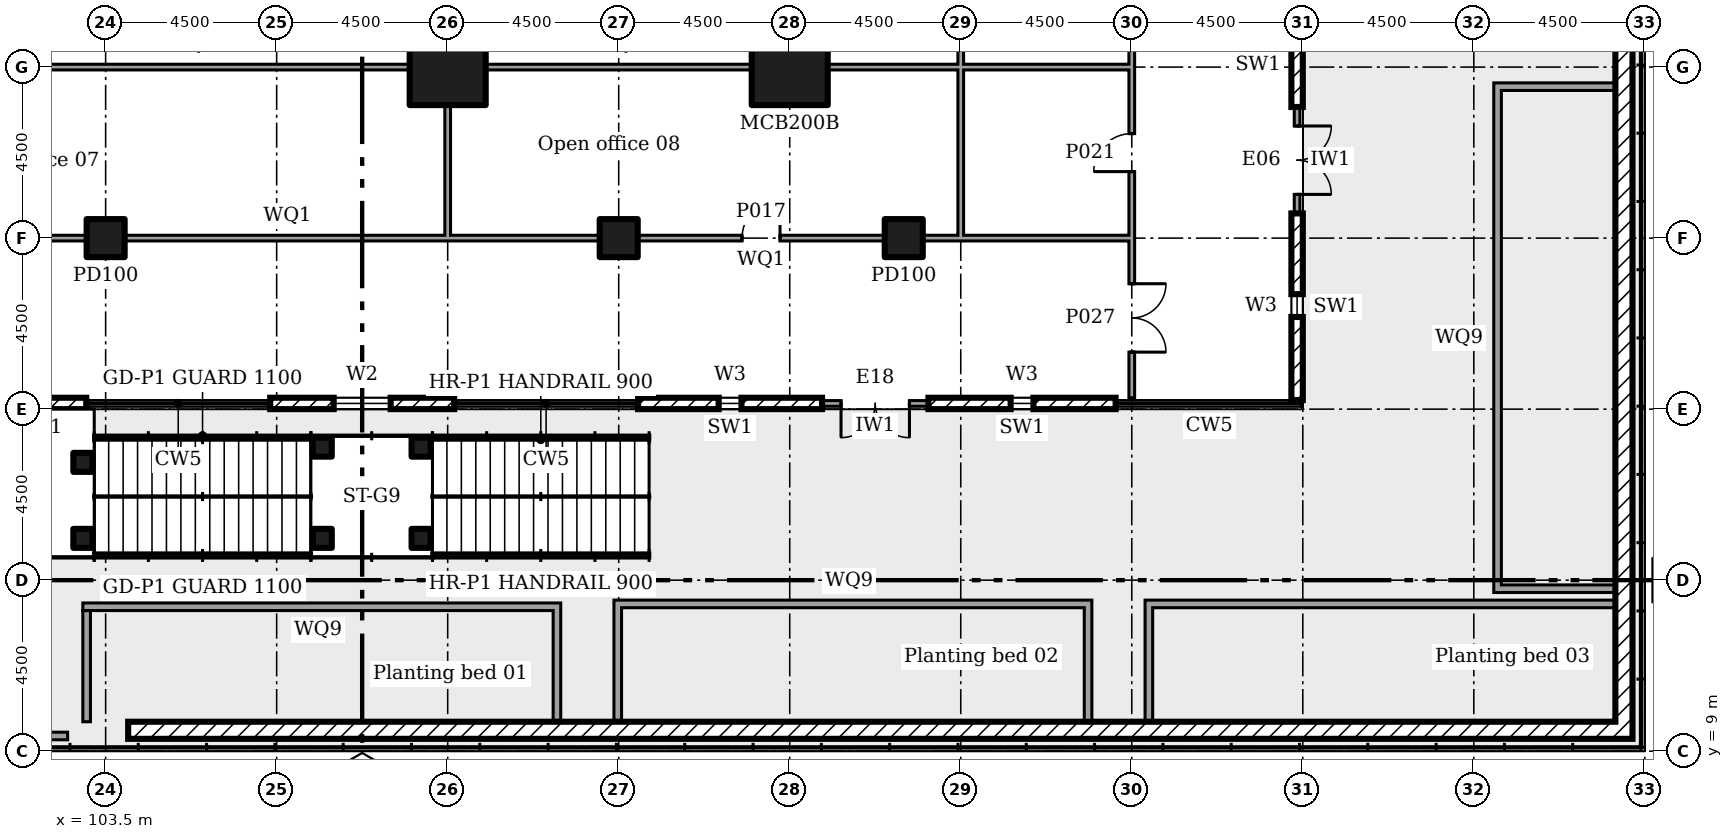
"""IFC4 building model, lengths in metres.
Left out: names, types, materials, properties, quantities, classifications, styles, units other than length and angle.
Written with IfcOpenShell. Run it as: python <this file> out.ifc"""

import sys

from ifc_helpers import new_model, si_unit, direction, frame, frame_2d, origin, origin_2d, place, context, subcontext, project, spatial, rectangle, extrude, element, fill, save


model = new_model("IFC4")
c1 = context("Model", 3, precision=1e-05, world=origin(), true_north=direction((0.0, 1.0)))
c2 = subcontext(c1, "Body", "Model", "MODEL_VIEW")
j1 = project(units=[si_unit("LENGTHUNIT", "METRE"), si_unit("PLANEANGLEUNIT", "RADIAN")], contexts=[c1])
p1 = place(None, origin())
s1 = spatial("IfcSite", under=j1, at=p1, CompositionType="ELEMENT")
p2 = place(p1, origin())
s2 = spatial("IfcBuilding", under=s1, at=p2, CompositionType="ELEMENT")
p3 = place(p2, frame((0.0, 0.0, 11.5)))
s3 = spatial("IfcBuildingStorey", under=s2, at=p3, CompositionType="ELEMENT", Elevation=11.5)
for number, where in (
    (1, (112.5, 27.0, 0.0)),
    (2, (121.5, 27.0, 0.0)),
):
    element("IfcColumn", number, at=place(p3, frame(where)), inside=s3, PredefinedType="COLUMN", context=c2, shape_type="SweptSolid", body=[
        extrude(rectangle(XDim=2.0, YDim=2.0, at=origin_2d()), origin(), (0.0, 0.0, 1.0), 5.0),
    ])
for number, where in (
    (3, (103.5, 22.5, 0.0)),
    (4, (117.0, 22.5, 0.0)),
    (5, (124.5, 22.5, 0.0)),
):
    element("IfcColumn", number, at=place(p3, frame(where)), inside=s3, PredefinedType="COLUMN", context=c2, shape_type="SweptSolid", body=[
        extrude(rectangle(XDim=1.0, YDim=1.0, at=origin_2d()), origin(), (0.0, 0.0, 1.0), 5.0),
    ])
p4 = place(p3, frame((98.15, 18.15, 0.0)))
e6 = element("IfcWall", 6, at=p4, inside=s3, PredefinedType="ELEMENTEDWALL", context=c2, shape_type="SweptSolid", body=[
    extrude(rectangle(XDim=4.84, YDim=0.3, at=frame_2d((2.42, 0.0))), origin(), (0.0, 0.0, 1.0), 4.55),
])
p5 = place(p4, frame((2.12, 0.0, 0.45)))
e7 = element("IfcOpeningElement", 7, at=p5, cuts=e6, PredefinedType="OPENING", context=c2, shape_type="SweptSolid", body=[
    extrude(rectangle(XDim=0.6, YDim=2.4, at=frame_2d((0.3, 1.2))), frame((0.0, 0.16, 0.0), z_axis=(0.0, -1.0, 0.0), x_axis=(1.0, 0.0, 0.0)), (0.0, 0.0, 1.0), 0.32),
])
p6 = place(p3, frame((107.83, 18.15, 0.0)))
e8 = element("IfcWall", 8, at=p6, inside=s3, PredefinedType="ELEMENTEDWALL", context=c2, shape_type="SweptSolid", body=[
    extrude(rectangle(XDim=4.84, YDim=0.3, at=frame_2d((2.42, 0.0))), origin(), (0.0, 0.0, 1.0), 4.55),
])
p7 = place(p6, frame((1.67, 0.0, 0.9)))
e9 = element("IfcOpeningElement", 9, at=p7, cuts=e8, PredefinedType="OPENING", context=c2, shape_type="SweptSolid", body=[
    extrude(rectangle(XDim=1.5, YDim=1.8, at=frame_2d((0.75, 0.9))), frame((0.0, 0.16, 0.0), z_axis=(0.0, -1.0, 0.0), x_axis=(1.0, 0.0, 0.0)), (0.0, 0.0, 1.0), 0.32),
])
p8 = place(p3, frame((117.51, 18.15, 0.0)))
e10 = element("IfcWall", 10, at=p8, inside=s3, PredefinedType="ELEMENTEDWALL", context=c2, shape_type="SweptSolid", body=[
    extrude(rectangle(XDim=4.84, YDim=0.3, at=frame_2d((2.42, 0.0))), origin(), (0.0, 0.0, 1.0), 4.55),
])
p9 = place(p8, frame((2.12, 0.0, 0.45)))
e11 = element("IfcOpeningElement", 11, at=p9, cuts=e10, PredefinedType="OPENING", context=c2, shape_type="SweptSolid", body=[
    extrude(rectangle(XDim=0.6, YDim=2.4, at=frame_2d((0.3, 1.2))), frame((0.0, 0.16, 0.0), z_axis=(0.0, -1.0, 0.0), x_axis=(1.0, 0.0, 0.0)), (0.0, 0.0, 1.0), 0.32),
])
p10 = place(p3, frame((122.35, 18.15, 0.0)))
e12 = element("IfcWall", 12, at=p10, inside=s3, PredefinedType="SOLIDWALL", context=c2, shape_type="SweptSolid", body=[
    extrude(rectangle(XDim=2.8, YDim=0.15, at=frame_2d((1.4, 0.0))), origin(), (0.0, 0.0, 1.0), 4.55),
])
p11 = place(p10, frame((0.5, 0.0, 0.0)))
e13 = element("IfcOpeningElement", 13, at=p11, cuts=e12, PredefinedType="OPENING", context=c2, shape_type="SweptSolid", body=[
    extrude(rectangle(XDim=1.8, YDim=2.4, at=frame_2d((0.9, 1.2))), frame((0.0, 0.085, 0.0), z_axis=(0.0, -1.0, 0.0), x_axis=(1.0, 0.0, 0.0)), (0.0, 0.0, 1.0), 0.17),
])
p12 = place(p3, frame((125.15, 18.15, 0.0)))
e14 = element("IfcWall", 14, at=p12, inside=s3, PredefinedType="ELEMENTEDWALL", context=c2, shape_type="SweptSolid", body=[
    extrude(rectangle(XDim=4.925, YDim=0.3, at=frame_2d((2.462, 0.0))), origin(), (0.0, 0.0, 1.0), 4.55),
])
p13 = place(p12, frame((2.163, 0.0, 0.45)))
e15 = element("IfcOpeningElement", 15, at=p13, cuts=e14, PredefinedType="OPENING", context=c2, shape_type="SweptSolid", body=[
    extrude(rectangle(XDim=0.6, YDim=2.4, at=frame_2d((0.3, 1.2))), frame((0.0, 0.16, 0.0), z_axis=(0.0, -1.0, 0.0), x_axis=(1.0, 0.0, 0.0)), (0.0, 0.0, 1.0), 0.32),
])
p14 = place(p3, frame((134.85, 18.238, 0.0), z_axis=(0.0, 0.0, 1.0), x_axis=(0.0, 1.0, 0.0)))
e16 = element("IfcWall", 16, at=p14, inside=s3, PredefinedType="ELEMENTEDWALL", context=c2, shape_type="SweptSolid", body=[
    extrude(rectangle(XDim=4.912, YDim=0.3, at=frame_2d((2.456, 0.0))), origin(), (0.0, 0.0, 1.0), 4.55),
])
p15 = place(p14, frame((2.188, 0.0, 0.45)))
e17 = element("IfcOpeningElement", 17, at=p15, cuts=e16, PredefinedType="OPENING", context=c2, shape_type="SweptSolid", body=[
    extrude(rectangle(XDim=0.6, YDim=2.4, at=frame_2d((0.3, 1.2))), frame((0.0, 0.16, 0.0), z_axis=(0.0, -1.0, 0.0), x_axis=(1.0, 0.0, 0.0)), (0.0, 0.0, 1.0), 0.32),
])
p16 = place(p3, frame((134.85, 23.15, 0.0), z_axis=(0.0, 0.0, 1.0), x_axis=(0.0, 1.0, 0.0)))
e18 = element("IfcWall", 18, at=p16, inside=s3, PredefinedType="SOLIDWALL", context=c2, shape_type="SweptSolid", body=[
    extrude(rectangle(XDim=2.8, YDim=0.15, at=frame_2d((1.4, 0.0))), origin(), (0.0, 0.0, 1.0), 4.55),
])
p17 = place(p16, frame((0.5, 0.0, 0.0)))
e19 = element("IfcOpeningElement", 19, at=p17, cuts=e18, PredefinedType="OPENING", context=c2, shape_type="SweptSolid", body=[
    extrude(rectangle(XDim=1.8, YDim=2.4, at=frame_2d((0.9, 1.2))), frame((0.0, 0.085, 0.0), z_axis=(0.0, -1.0, 0.0), x_axis=(1.0, 0.0, 0.0)), (0.0, 0.0, 1.0), 0.17),
])
p18 = place(p3, frame((134.85, 25.95, 0.0), z_axis=(0.0, 0.0, 1.0), x_axis=(0.0, 1.0, 0.0)))
e20 = element("IfcWall", 20, at=p18, inside=s3, PredefinedType="ELEMENTEDWALL", context=c2, shape_type="SweptSolid", body=[
    extrude(rectangle(XDim=4.43, YDim=0.3, at=frame_2d((2.215, 0.0))), origin(), (0.0, 0.0, 1.0), 4.55),
])
p19 = place(p18, frame((1.915, 0.0, 0.45)))
e21 = element("IfcOpeningElement", 21, at=p19, cuts=e20, PredefinedType="OPENING", context=c2, shape_type="SweptSolid", body=[
    extrude(rectangle(XDim=0.6, YDim=2.4, at=frame_2d((0.3, 1.2))), frame((0.0, 0.16, 0.0), z_axis=(0.0, -1.0, 0.0), x_axis=(1.0, 0.0, 0.0)), (0.0, 0.0, 1.0), 0.32),
])
p20 = place(p3, frame((104.093, 9.55, 0.0)))
e22 = element("IfcWall", 22, at=p20, inside=s3, PredefinedType="SOLIDWALL", context=c2, shape_type="SweptSolid", body=[
    extrude(rectangle(XDim=39.583, YDim=0.45, at=frame_2d((19.791, 0.0))), origin(), (0.0, 0.0, 1.0), 0.6),
])
p21 = place(p3, frame((143.45, 9.775, 0.0), z_axis=(0.0, 0.0, 1.0), x_axis=(0.0, 1.0, 0.0)))
e23 = element("IfcWall", 23, at=p21, inside=s3, PredefinedType="SOLIDWALL", context=c2, shape_type="SweptSolid", body=[
    extrude(rectangle(XDim=79.9, YDim=0.45, at=frame_2d((39.95, 0.0))), origin(), (0.0, 0.0, 1.0), 0.6),
])
p22 = place(p3, frame((115.375, 9.775, 0.0), z_axis=(0.0, 0.0, 1.0), x_axis=(0.0, 1.0, 0.0)))
e24 = element("IfcWall", 24, at=p22, inside=s3, PredefinedType="SOLIDWALL", context=c2, shape_type="SweptSolid", body=[
    extrude(rectangle(XDim=3.125, YDim=0.2, at=frame_2d((1.562, 0.0))), origin(), (0.0, 0.0, 1.0), 0.45),
])
p23 = place(p3, frame((102.9, 12.8, 0.0)))
e25 = element("IfcWall", 25, at=p23, inside=s3, PredefinedType="SOLIDWALL", context=c2, shape_type="SweptSolid", body=[
    extrude(rectangle(XDim=12.375, YDim=0.2, at=frame_2d((6.188, 0.0))), origin(), (0.0, 0.0, 1.0), 0.45),
])
p24 = place(p3, frame((103.0, 9.775, 0.0), z_axis=(0.0, 0.0, 1.0), x_axis=(0.0, 1.0, 0.0)))
e26 = element("IfcWall", 26, at=p24, inside=s3, PredefinedType="SOLIDWALL", context=c2, shape_type="SweptSolid", body=[
    extrude(rectangle(XDim=2.925, YDim=0.2, at=frame_2d((1.462, 0.0))), origin(), (0.0, 0.0, 1.0), 0.45),
])
p25 = place(p3, frame((129.35, 9.775, 0.0), z_axis=(0.0, 0.0, 1.0), x_axis=(0.0, 1.0, 0.0)))
e27 = element("IfcWall", 27, at=p25, inside=s3, PredefinedType="SOLIDWALL", context=c2, shape_type="SweptSolid", body=[
    extrude(rectangle(XDim=3.2, YDim=0.2, at=frame_2d((1.6, 0.0))), origin(), (0.0, 0.0, 1.0), 0.45),
])
p26 = place(p3, frame((116.875, 12.875, 0.0)))
e28 = element("IfcWall", 28, at=p26, inside=s3, PredefinedType="SOLIDWALL", context=c2, shape_type="SweptSolid", body=[
    extrude(rectangle(XDim=12.375, YDim=0.2, at=frame_2d((6.188, 0.0))), origin(), (0.0, 0.0, 1.0), 0.45),
])
p27 = place(p3, frame((116.975, 9.775, 0.0), z_axis=(0.0, 0.0, 1.0), x_axis=(0.0, 1.0, 0.0)))
e29 = element("IfcWall", 29, at=p27, inside=s3, PredefinedType="SOLIDWALL", context=c2, shape_type="SweptSolid", body=[
    extrude(rectangle(XDim=3.0, YDim=0.2, at=frame_2d((1.5, 0.0))), origin(), (0.0, 0.0, 1.0), 0.45),
])
p28 = place(p3, frame((130.85, 12.875, 0.0)))
e30 = element("IfcWall", 30, at=p28, inside=s3, PredefinedType="SOLIDWALL", context=c2, shape_type="SweptSolid", body=[
    extrude(rectangle(XDim=12.375, YDim=0.2, at=frame_2d((6.188, 0.0))), origin(), (0.0, 0.0, 1.0), 0.45),
])
p29 = place(p3, frame((130.95, 9.775, 0.0), z_axis=(0.0, 0.0, 1.0), x_axis=(0.0, 1.0, 0.0)))
e31 = element("IfcWall", 31, at=p29, inside=s3, PredefinedType="SOLIDWALL", context=c2, shape_type="SweptSolid", body=[
    extrude(rectangle(XDim=3.0, YDim=0.2, at=frame_2d((1.5, 0.0))), origin(), (0.0, 0.0, 1.0), 0.45),
])
for number, where in (
    (32, (140.025, 26.485, 0.0)),
    (33, (140.025, 13.275, 0.0)),
):
    element("IfcWall", number, at=place(p3, frame(where)), inside=s3, PredefinedType="SOLIDWALL", context=c2, shape_type="SweptSolid", body=[
        extrude(rectangle(XDim=3.2, YDim=0.2, at=frame_2d((1.6, 0.0))), origin(), (0.0, 0.0, 1.0), 0.45),
    ])
p30 = place(p3, frame((140.125, 13.375, 0.0), z_axis=(0.0, 0.0, 1.0), x_axis=(0.0, 1.0, 0.0)))
e34 = element("IfcWall", 34, at=p30, inside=s3, PredefinedType="SOLIDWALL", context=c2, shape_type="SweptSolid", body=[
    extrude(rectangle(XDim=13.01, YDim=0.2, at=frame_2d((6.505, 0.0))), origin(), (0.0, 0.0, 1.0), 0.45),
])
p31 = place(p3, frame((130.5, 18.3, 0.0), z_axis=(0.0, 0.0, 1.0), x_axis=(0.0, 1.0, 0.0)))
e35 = element("IfcWall", 35, at=p31, inside=s3, PredefinedType="PARTITIONING", context=c2, shape_type="SweptSolid", body=[
    extrude(rectangle(XDim=4.275, YDim=0.15, at=frame_2d((2.137, 0.0))), origin(), (0.0, 0.0, 1.0), 4.55),
])
p32 = place(p31, frame((1.2, 0.0, 0.0)))
e36 = element("IfcOpeningElement", 36, at=p32, cuts=e35, PredefinedType="OPENING", context=c2, shape_type="SweptSolid", body=[
    extrude(rectangle(XDim=1.8, YDim=2.1, at=frame_2d((0.9, 1.05))), frame((0.0, 0.085, 0.0), z_axis=(0.0, -1.0, 0.0), x_axis=(1.0, 0.0, 0.0)), (0.0, 0.0, 1.0), 0.17),
])
p33 = place(p3, frame((130.5, 26.925, 0.0), z_axis=(0.0, 0.0, 1.0), x_axis=(0.0, 1.0, 0.0)))
e37 = element("IfcWall", 37, at=p33, inside=s3, PredefinedType="PARTITIONING", context=c2, shape_type="SweptSolid", body=[
    extrude(rectangle(XDim=8.58, YDim=0.15, at=frame_2d((4.29, 0.0))), origin(), (0.0, 0.0, 1.0), 4.55),
])
p34 = place(p3, frame((130.5, 22.5, 0.0), z_axis=(0.0, 0.0, 1.0), x_axis=(0.0, 1.0, 0.0)))
e38 = element("IfcWall", 38, at=p34, inside=s3, PredefinedType="PARTITIONING", context=c2, shape_type="SweptSolid", body=[
    extrude(rectangle(XDim=4.5, YDim=0.15, at=frame_2d((2.25, 0.0))), origin(), (0.0, 0.0, 1.0), 4.55),
])
p35 = place(p34, frame((1.75, 0.0, 0.0)))
e39 = element("IfcOpeningElement", 39, at=p35, cuts=e38, PredefinedType="OPENING", context=c2, shape_type="SweptSolid", body=[
    extrude(rectangle(XDim=1.0, YDim=2.1, at=frame_2d((0.5, 1.05))), frame((0.0, 0.085, 0.0), z_axis=(0.0, -1.0, 0.0), x_axis=(1.0, 0.0, 0.0)), (0.0, 0.0, 1.0), 0.17),
])
p36 = place(p3, frame((94.5, 22.5, 0.0)))
e40 = element("IfcWall", 40, at=p36, inside=s3, PredefinedType="PARTITIONING", context=c2, shape_type="SweptSolid", body=[
    extrude(rectangle(XDim=8.505, YDim=0.15, at=frame_2d((4.252, 0.0))), origin(), (0.0, 0.0, 1.0), 4.55),
])
p37 = place(p36, frame((3.75, 0.0, 0.0)))
e41 = element("IfcOpeningElement", 41, at=p37, cuts=e40, PredefinedType="OPENING", context=c2, shape_type="SweptSolid", body=[
    extrude(rectangle(XDim=1.0, YDim=2.1, at=frame_2d((0.5, 1.05))), frame((0.0, 0.085, 0.0), z_axis=(0.0, -1.0, 0.0), x_axis=(1.0, 0.0, 0.0)), (0.0, 0.0, 1.0), 0.17),
])
p38 = place(p3, frame((103.995, 22.5, 0.0)))
e42 = element("IfcWall", 42, at=p38, inside=s3, PredefinedType="PARTITIONING", context=c2, shape_type="SweptSolid", body=[
    extrude(rectangle(XDim=8.58, YDim=0.15, at=frame_2d((4.29, 0.0))), origin(), (0.0, 0.0, 1.0), 4.55),
])
p39 = place(p3, frame((112.5, 22.5, 0.0)))
e43 = element("IfcWall", 43, at=p39, inside=s3, PredefinedType="PARTITIONING", context=c2, shape_type="SweptSolid", body=[
    extrude(rectangle(XDim=4.005, YDim=0.15, at=frame_2d((2.002, 0.0))), origin(), (0.0, 0.0, 1.0), 4.55),
])
p40 = place(p3, frame((117.495, 22.5, 0.0)))
e44 = element("IfcWall", 44, at=p40, inside=s3, PredefinedType="PARTITIONING", context=c2, shape_type="SweptSolid", body=[
    extrude(rectangle(XDim=6.51, YDim=0.15, at=frame_2d((3.255, 0.0))), origin(), (0.0, 0.0, 1.0), 4.55),
])
p41 = place(p40, frame((2.75, 0.0, 0.0)))
e45 = element("IfcOpeningElement", 45, at=p41, cuts=e44, PredefinedType="OPENING", context=c2, shape_type="SweptSolid", body=[
    extrude(rectangle(XDim=1.0, YDim=2.1, at=frame_2d((0.5, 1.05))), frame((0.0, 0.085, 0.0), z_axis=(0.0, -1.0, 0.0), x_axis=(1.0, 0.0, 0.0)), (0.0, 0.0, 1.0), 0.17),
])
p42 = place(p3, frame((124.995, 22.5, 0.0)))
e46 = element("IfcWall", 46, at=p42, inside=s3, PredefinedType="PARTITIONING", context=c2, shape_type="SweptSolid", body=[
    extrude(rectangle(XDim=1.08, YDim=0.15, at=frame_2d((0.54, 0.0))), origin(), (0.0, 0.0, 1.0), 4.55),
])
p43 = place(p3, frame((126.0, 22.5, 0.0)))
e47 = element("IfcWall", 47, at=p43, inside=s3, PredefinedType="PARTITIONING", context=c2, shape_type="SweptSolid", body=[
    extrude(rectangle(XDim=4.425, YDim=0.15, at=frame_2d((2.212, 0.0))), origin(), (0.0, 0.0, 1.0), 4.55),
])
p44 = place(p3, frame((99.995, 27.0, 0.0)))
e48 = element("IfcWall", 48, at=p44, inside=s3, PredefinedType="PARTITIONING", context=c2, shape_type="SweptSolid", body=[
    extrude(rectangle(XDim=11.51, YDim=0.15, at=frame_2d((5.755, 0.0))), origin(), (0.0, 0.0, 1.0), 4.55),
])
p45 = place(p3, frame((113.495, 27.0, 0.0)))
e49 = element("IfcWall", 49, at=p45, inside=s3, PredefinedType="PARTITIONING", context=c2, shape_type="SweptSolid", body=[
    extrude(rectangle(XDim=7.01, YDim=0.15, at=frame_2d((3.505, 0.0))), origin(), (0.0, 0.0, 1.0), 4.55),
])
p46 = place(p3, frame((122.495, 27.0, 0.0)))
e50 = element("IfcWall", 50, at=p46, inside=s3, PredefinedType="PARTITIONING", context=c2, shape_type="SweptSolid", body=[
    extrude(rectangle(XDim=3.58, YDim=0.15, at=frame_2d((1.79, 0.0))), origin(), (0.0, 0.0, 1.0), 4.55),
])
p47 = place(p3, frame((126.0, 26.925, 0.0), z_axis=(0.0, 0.0, 1.0), x_axis=(0.0, 1.0, 0.0)))
e51 = element("IfcWall", 51, at=p47, inside=s3, PredefinedType="PARTITIONING", context=c2, shape_type="SweptSolid", body=[
    extrude(rectangle(XDim=3.58, YDim=0.15, at=frame_2d((1.79, 0.0))), origin(), (0.0, 0.0, 1.0), 4.55),
])
p48 = place(p3, frame((112.5, 22.575, 0.0), z_axis=(0.0, 0.0, 1.0), x_axis=(0.0, 1.0, 0.0)))
e52 = element("IfcWall", 52, at=p48, inside=s3, PredefinedType="PARTITIONING", context=c2, shape_type="SweptSolid", body=[
    extrude(rectangle(XDim=3.43, YDim=0.15, at=frame_2d((1.715, 0.0))), origin(), (0.0, 0.0, 1.0), 4.55),
])
p49 = place(p3, frame((126.0, 22.575, 0.0), z_axis=(0.0, 0.0, 1.0), x_axis=(0.0, 1.0, 0.0)))
e53 = element("IfcWall", 53, at=p49, inside=s3, PredefinedType="PARTITIONING", context=c2, shape_type="SweptSolid", body=[
    extrude(rectangle(XDim=4.35, YDim=0.15, at=frame_2d((2.175, 0.0))), origin(), (0.0, 0.0, 1.0), 4.55),
])
p50 = place(p3, frame((126.075, 27.0, 0.0)))
e54 = element("IfcWall", 54, at=p50, inside=s3, PredefinedType="PARTITIONING", context=c2, shape_type="SweptSolid", body=[
    extrude(rectangle(XDim=4.35, YDim=0.15, at=frame_2d((2.175, 0.0))), origin(), (0.0, 0.0, 1.0), 4.55),
])
p51 = place(p3, frame((98.7, 9.4, 0.0)))
e55 = element("IfcWall", 55, at=p51, inside=s3, PredefinedType="SOLIDWALL", context=c2, shape_type="SweptSolid", body=[
    extrude(rectangle(XDim=3.8, YDim=0.2, at=frame_2d((1.9, 0.0))), origin(), (0.0, 0.0, 1.0), 2.3),
])
p52 = place(p51, frame((0.6, 0.0, 0.0)))
e56 = element("IfcOpeningElement", 56, at=p52, cuts=e55, PredefinedType="OPENING", context=c2, shape_type="SweptSolid", body=[
    extrude(rectangle(XDim=2.6, YDim=2.1, at=frame_2d((1.3, 1.05))), frame((0.0, 0.11, 0.0), z_axis=(0.0, -1.0, 0.0), x_axis=(1.0, 0.0, 0.0)), (0.0, 0.0, 1.0), 0.22),
])
for number, where in (
    (57, (102.9, 16.6, 0.0)),
    (58, (102.9, 14.6, 0.0)),
):
    element("IfcColumn", number, at=place(p3, frame(where)), inside=s3, PredefinedType="COLUMN", context=c2, shape_type="SweptSolid", body=[
        extrude(rectangle(XDim=0.5, YDim=0.5, at=origin_2d()), origin(), (0.0, 0.0, 1.0), 4.75),
    ])
for number, where in (
    (59, (109.2, 17.0, 0.0)),
    (60, (109.2, 14.6, 0.0)),
    (61, (111.8, 17.0, 0.0)),
    (62, (111.8, 14.6, 0.0)),
):
    element("IfcColumn", number, at=place(p3, frame(where)), inside=s3, PredefinedType="COLUMN", context=c2, shape_type="SweptSolid", body=[
        extrude(rectangle(XDim=0.5, YDim=0.5, at=origin_2d()), origin(), (0.0, 0.0, 1.0), 2.25),
    ])
p53 = place(p7, origin())
e63 = element("IfcWindow", 63, at=p53, inside=s3, PartitioningType="SINGLE_PANEL", PredefinedType="WINDOW", context=c2, shape_type="SweptSolid", body=[
    extrude(rectangle(XDim=1.5, YDim=1.8, at=frame_2d((0.75, 0.9))), frame((0.0, 0.03, 0.0), z_axis=(0.0, -1.0, 0.0), x_axis=(1.0, 0.0, 0.0)), (0.0, 0.0, 1.0), 0.06),
])
fill(e9, e63)
p54 = place(p9, origin())
e64 = element("IfcWindow", 64, at=p54, inside=s3, PartitioningType="SINGLE_PANEL", PredefinedType="WINDOW", context=c2, shape_type="SweptSolid", body=[
    extrude(rectangle(XDim=0.6, YDim=2.4, at=frame_2d((0.3, 1.2))), frame((0.0, 0.03, 0.0), z_axis=(0.0, -1.0, 0.0), x_axis=(1.0, 0.0, 0.0)), (0.0, 0.0, 1.0), 0.06),
])
fill(e11, e64)
p55 = place(p11, frame((1.8, 0.0, 0.0), x_axis=(-1.0, 0.0, 0.0)))
e65 = element("IfcDoor", 65, at=p55, inside=s3, OperationType="DOUBLE_DOOR_DOUBLE_SWING", PredefinedType="NOTDEFINED", context=c2, shape_type="SweptSolid", body=[
    extrude(rectangle(XDim=1.8, YDim=2.4, at=frame_2d((0.9, 1.2))), frame((0.0, 0.025, 0.0), z_axis=(0.0, -1.0, 0.0), x_axis=(1.0, 0.0, 0.0)), (0.0, 0.0, 1.0), 0.05),
])
fill(e13, e65)
p56 = place(p13, origin())
e66 = element("IfcWindow", 66, at=p56, inside=s3, PartitioningType="SINGLE_PANEL", PredefinedType="WINDOW", context=c2, shape_type="SweptSolid", body=[
    extrude(rectangle(XDim=0.6, YDim=2.4, at=frame_2d((0.3, 1.2))), frame((0.0, 0.03, 0.0), z_axis=(0.0, -1.0, 0.0), x_axis=(1.0, 0.0, 0.0)), (0.0, 0.0, 1.0), 0.06),
])
fill(e15, e66)
p57 = place(p15, origin())
e67 = element("IfcWindow", 67, at=p57, inside=s3, PartitioningType="SINGLE_PANEL", PredefinedType="WINDOW", context=c2, shape_type="SweptSolid", body=[
    extrude(rectangle(XDim=0.6, YDim=2.4, at=frame_2d((0.3, 1.2))), frame((0.0, 0.03, 0.0), z_axis=(0.0, -1.0, 0.0), x_axis=(1.0, 0.0, 0.0)), (0.0, 0.0, 1.0), 0.06),
])
fill(e17, e67)
p58 = place(p17, frame((1.8, 0.0, 0.0), x_axis=(-1.0, 0.0, 0.0)))
e68 = element("IfcDoor", 68, at=p58, inside=s3, OperationType="DOUBLE_DOOR_DOUBLE_SWING", PredefinedType="NOTDEFINED", context=c2, shape_type="SweptSolid", body=[
    extrude(rectangle(XDim=1.8, YDim=2.4, at=frame_2d((0.9, 1.2))), frame((0.0, 0.025, 0.0), z_axis=(0.0, -1.0, 0.0), x_axis=(1.0, 0.0, 0.0)), (0.0, 0.0, 1.0), 0.05),
])
fill(e19, e68)
p59 = place(p41, origin())
e69 = element("IfcDoor", 69, at=p59, inside=s3, OperationType="SINGLE_SWING_LEFT", PredefinedType="DOOR", context=c2, shape_type="SweptSolid", body=[
    extrude(rectangle(XDim=1.0, YDim=2.1, at=frame_2d((0.5, 1.05))), frame((0.0, 0.025, 0.0), z_axis=(0.0, -1.0, 0.0), x_axis=(1.0, 0.0, 0.0)), (0.0, 0.0, 1.0), 0.05),
])
fill(e45, e69)
p60 = place(p35, origin())
e70 = element("IfcDoor", 70, at=p60, inside=s3, OperationType="SINGLE_SWING_RIGHT", PredefinedType="DOOR", context=c2, shape_type="SweptSolid", body=[
    extrude(rectangle(XDim=1.0, YDim=2.1, at=frame_2d((0.5, 1.05))), frame((0.0, 0.025, 0.0), z_axis=(0.0, -1.0, 0.0), x_axis=(1.0, 0.0, 0.0)), (0.0, 0.0, 1.0), 0.05),
])
fill(e39, e70)
p61 = place(p32, frame((1.8, 0.0, 0.0), x_axis=(-1.0, 0.0, 0.0)))
e71 = element("IfcDoor", 71, at=p61, inside=s3, OperationType="DOUBLE_DOOR_SINGLE_SWING", PredefinedType="DOOR", context=c2, shape_type="SweptSolid", body=[
    extrude(rectangle(XDim=1.8, YDim=2.1, at=frame_2d((0.9, 1.05))), frame((0.0, 0.025, 0.0), z_axis=(0.0, -1.0, 0.0), x_axis=(1.0, 0.0, 0.0)), (0.0, 0.0, 1.0), 0.05),
])
fill(e36, e71)
save(model, sys.argv[1])
